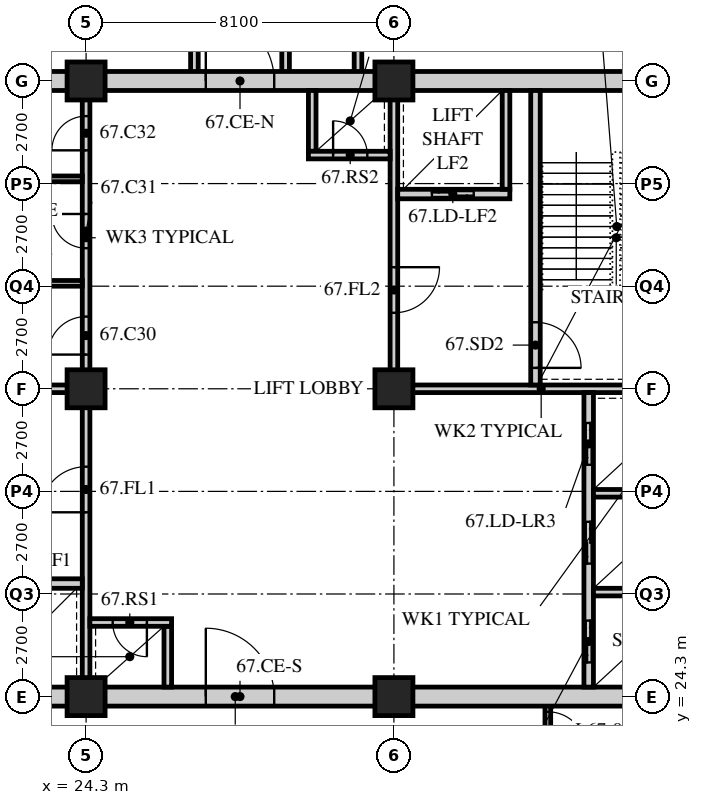
"""IFC4 building model, lengths in metres.
Left out: names, types, materials, properties, quantities, classifications, styles, units other than length and angle.
Written with IfcOpenShell. Run it as: python <this file> out.ifc"""

import sys

from ifc_helpers import new_model, si_unit, direction, frame, frame_2d, origin, origin_2d, place, context, subcontext, project, spatial, rectangle, hollow_rectangle, extrude, element, fill, save


model = new_model("IFC4")
c1 = context("Model", 3, precision=1e-05, world=origin(), true_north=direction((0.0, 1.0)))
c2 = subcontext(c1, "Body", "Model", "MODEL_VIEW")
j1 = project(units=[si_unit("LENGTHUNIT", "METRE"), si_unit("PLANEANGLEUNIT", "RADIAN")], contexts=[c1])
p1 = place(None, origin())
s1 = spatial("IfcSite", under=j1, at=p1, CompositionType="ELEMENT")
p2 = place(p1, origin())
s2 = spatial("IfcBuilding", under=s1, at=p2, CompositionType="ELEMENT")
p3 = place(p2, frame((0.0, 0.0, 261.9)))
s3 = spatial("IfcBuildingStorey", under=s2, at=p3, CompositionType="ELEMENT", Elevation=261.9)
for number, where, z_axis, x_axis in (
    (1, (24.3, 24.3, 0.0), (0.0, 0.0, 1.0), (1.0, 0.0, 0.0)),
    (2, (24.3, 32.4, 0.0), (0.0, 0.0, 1.0), (1.0, 0.0, 0.0)),
    (3, (24.3, 40.5, 0.0), (0.0, 0.0, 1.0), (1.0, 0.0, 0.0)),
    (4, (32.4, 24.3, 0.0), (0.0, 0.0, 1.0), (1.0, 0.0, 0.0)),
    (5, (32.4, 32.4, 0.0), (0.0, 0.0, 1.0), (1.0, 0.0, 0.0)),
    (6, (32.4, 40.5, 0.0), (0.0, 0.0, 1.0), (1.0, 0.0, 0.0)),
):
    element("IfcColumn", number, at=place(p3, frame(where, z_axis=z_axis, x_axis=x_axis)), inside=s3, PredefinedType="COLUMN", context=c2, shape_type="SweptSolid", body=[
        extrude(hollow_rectangle(XDim=1.0, YDim=1.0, WallThickness=0.1, at=origin_2d()), origin(), (0.0, 0.0, 1.0), 3.9),
    ])
for number, where, z_axis, x_axis in (
    (7, (31.455, 46.8, 0.0), (0.0, 0.0, 1.0), (0.0, -1.0, 0.0)),
    (8, (27.15, 40.5, 0.0), (0.0, 0.0, 1.0), (0.0, 1.0, 0.0)),
    (9, (29.55, 40.5, 0.0), (0.0, 0.0, 1.0), (0.0, 1.0, 0.0)),
):
    element("IfcWall", number, at=place(p3, frame(where, z_axis=z_axis, x_axis=x_axis)), inside=s3, PredefinedType="SOLIDWALL", context=c2, shape_type="SweptSolid", body=[
        extrude(rectangle(XDim=6.3, YDim=0.2, at=frame_2d((3.15, 0.0))), origin(), (0.0, 0.0, 1.0), 3.69),
    ])
p4 = place(p3, frame((36.45, 22.5, 0.0), z_axis=(0.0, 0.0, 1.0), x_axis=(0.0, 1.0, 0.0)))
e10 = element("IfcWall", 10, at=p4, inside=s3, PredefinedType="PARTITIONING", context=c2, shape_type="SweptSolid", body=[
    extrude(rectangle(XDim=1.8, YDim=0.15, at=frame_2d((0.9, 0.0))), origin(), (0.0, 0.0, 1.0), 3.69),
])
p5 = place(p4, frame((0.4, 0.0, 0.0)))
e11 = element("IfcOpeningElement", 11, at=p5, cuts=e10, PredefinedType="OPENING", context=c2, shape_type="SweptSolid", body=[
    extrude(rectangle(XDim=1.0, YDim=2.1, at=frame_2d((0.5, 1.05))), frame((0.0, 0.085, 0.0), z_axis=(0.0, -1.0, 0.0), x_axis=(1.0, 0.0, 0.0)), (0.0, 0.0, 1.0), 0.17),
])
p6 = place(p3, frame((15.95, 24.3, 0.0), z_axis=(0.0, 0.0, 1.0), x_axis=(1.0, 0.0, 0.0)))
e12 = element("IfcWall", 12, at=p6, inside=s3, PredefinedType="SOLIDWALL", context=c2, shape_type="SweptSolid", body=[
    extrude(rectangle(XDim=24.55, YDim=0.5, at=frame_2d((12.275, 0.0))), origin(), (0.0, 0.0, 1.0), 3.04),
])
p7 = place(p6, frame((11.5, 0.0, 0.0)))
e13 = element("IfcOpeningElement", 13, at=p7, cuts=e12, PredefinedType="OPENING", context=c2, shape_type="SweptSolid", body=[
    extrude(rectangle(XDim=1.8, YDim=2.4, at=frame_2d((0.9, 1.2))), frame((0.0, 0.26, 0.0), z_axis=(0.0, -1.0, 0.0), x_axis=(1.0, 0.0, 0.0)), (0.0, 0.0, 1.0), 0.52),
])
p8 = place(p3, frame((15.95, 40.5, 0.0), z_axis=(0.0, 0.0, 1.0), x_axis=(1.0, 0.0, 0.0)))
e14 = element("IfcWall", 14, at=p8, inside=s3, PredefinedType="SOLIDWALL", context=c2, shape_type="SweptSolid", body=[
    extrude(rectangle(XDim=24.55, YDim=0.5, at=frame_2d((12.275, 0.0))), origin(), (0.0, 0.0, 1.0), 3.04),
])
p9 = place(p8, frame((11.5, 0.0, 0.0)))
e15 = element("IfcOpeningElement", 15, at=p9, cuts=e14, PredefinedType="OPENING", context=c2, shape_type="SweptSolid", body=[
    extrude(rectangle(XDim=1.8, YDim=2.4, at=frame_2d((0.9, 1.2))), frame((0.0, 0.26, 0.0), z_axis=(0.0, -1.0, 0.0), x_axis=(1.0, 0.0, 0.0)), (0.0, 0.0, 1.0), 0.52),
])
p10 = place(p3, frame((16.45, 32.4, 0.0), z_axis=(0.0, 0.0, 1.0), x_axis=(1.0, 0.0, 0.0)))
e16 = element("IfcWall", 16, at=p10, inside=s3, PredefinedType="SOLIDWALL", context=c2, shape_type="SweptSolid", body=[
    extrude(rectangle(XDim=7.95, YDim=0.2, at=frame_2d((3.975, 0.0))), origin(), (0.0, 0.0, 1.0), 3.078),
])
p11 = place(p3, frame((24.3, 24.55, 0.0), z_axis=(0.0, 0.0, 1.0), x_axis=(0.0, 1.0, 0.0)))
e17 = element("IfcWall", 17, at=p11, inside=s3, PredefinedType="SOLIDWALL", context=c2, shape_type="SweptSolid", body=[
    extrude(rectangle(XDim=7.75, YDim=0.2, at=frame_2d((3.875, 0.0))), origin(), (0.0, 0.0, 1.0), 3.078),
])
p12 = place(p11, frame((4.6, 0.0, 0.0)))
e18 = element("IfcOpeningElement", 18, at=p12, cuts=e17, PredefinedType="OPENING", context=c2, shape_type="SweptSolid", body=[
    extrude(rectangle(XDim=1.2, YDim=2.1, at=frame_2d((0.6, 1.05))), frame((0.0, 0.11, 0.0), z_axis=(0.0, -1.0, 0.0), x_axis=(1.0, 0.0, 0.0)), (0.0, 0.0, 1.0), 0.22),
])
p13 = place(p3, frame((21.25, 27.275, 0.0), z_axis=(0.0, 0.0, 1.0), x_axis=(1.0, 0.0, 0.0)))
e19 = element("IfcWall", 19, at=p13, inside=s3, PredefinedType="SOLIDWALL", context=c2, shape_type="SweptSolid", body=[
    extrude(rectangle(XDim=2.95, YDim=0.25, at=frame_2d((1.475, 0.0))), origin(), (0.0, 0.0, 1.0), 3.69),
])
p14 = place(p13, frame((0.95, 0.0, 0.0)))
e20 = element("IfcOpeningElement", 20, at=p14, cuts=e19, PredefinedType="OPENING", context=c2, shape_type="SweptSolid", body=[
    extrude(rectangle(XDim=1.1, YDim=2.4, at=frame_2d((0.55, 1.2))), frame((0.0, 0.135, 0.0), z_axis=(0.0, -1.0, 0.0), x_axis=(1.0, 0.0, 0.0)), (0.0, 0.0, 1.0), 0.27),
])
p15 = place(p3, frame((26.45, 24.55, 0.0), z_axis=(0.0, 0.0, 1.0), x_axis=(0.0, 1.0, 0.0)))
e21 = element("IfcWall", 21, at=p15, inside=s3, PredefinedType="SOLIDWALL", context=c2, shape_type="SweptSolid", body=[
    extrude(rectangle(XDim=1.6, YDim=0.2, at=frame_2d((0.8, 0.0))), origin(), (0.0, 0.0, 1.0), 3.69),
])
p16 = place(p3, frame((24.4, 26.25, 0.0), z_axis=(0.0, 0.0, 1.0), x_axis=(1.0, 0.0, 0.0)))
e22 = element("IfcWall", 22, at=p16, inside=s3, PredefinedType="SOLIDWALL", context=c2, shape_type="SweptSolid", body=[
    extrude(rectangle(XDim=2.15, YDim=0.2, at=frame_2d((1.075, 0.0))), origin(), (0.0, 0.0, 1.0), 3.69),
])
p17 = place(p16, frame((0.6, 0.0, 0.0)))
e23 = element("IfcOpeningElement", 23, at=p17, cuts=e22, PredefinedType="OPENING", context=c2, shape_type="SweptSolid", body=[
    extrude(rectangle(XDim=0.9, YDim=2.1, at=frame_2d((0.45, 1.05))), frame((0.0, 0.11, 0.0), z_axis=(0.0, -1.0, 0.0), x_axis=(1.0, 0.0, 0.0)), (0.0, 0.0, 1.0), 0.22),
])
p18 = place(p3, frame((32.3, 32.4, 0.0), z_axis=(0.0, 0.0, 1.0), x_axis=(1.0, 0.0, 0.0)))
e24 = element("IfcWall", 24, at=p18, inside=s3, PredefinedType="SOLIDWALL", context=c2, shape_type="SweptSolid", body=[
    extrude(rectangle(XDim=7.95, YDim=0.2, at=frame_2d((3.975, 0.0))), origin(), (0.0, 0.0, 1.0), 3.078),
])
p19 = place(p3, frame((32.4, 32.5, 0.0), z_axis=(0.0, 0.0, 1.0), x_axis=(0.0, 1.0, 0.0)))
e25 = element("IfcWall", 25, at=p19, inside=s3, PredefinedType="SOLIDWALL", context=c2, shape_type="SweptSolid", body=[
    extrude(rectangle(XDim=7.75, YDim=0.2, at=frame_2d((3.875, 0.0))), origin(), (0.0, 0.0, 1.0), 3.078),
])
p20 = place(p19, frame((1.9, 0.0, 0.0)))
e26 = element("IfcOpeningElement", 26, at=p20, cuts=e25, PredefinedType="OPENING", context=c2, shape_type="SweptSolid", body=[
    extrude(rectangle(XDim=1.2, YDim=2.1, at=frame_2d((0.6, 1.05))), frame((0.0, 0.11, 0.0), z_axis=(0.0, -1.0, 0.0), x_axis=(1.0, 0.0, 0.0)), (0.0, 0.0, 1.0), 0.22),
])
p21 = place(p3, frame((37.525, 24.55, 0.0), z_axis=(0.0, 0.0, 1.0), x_axis=(0.0, 1.0, 0.0)))
e27 = element("IfcWall", 27, at=p21, inside=s3, PredefinedType="SOLIDWALL", context=c2, shape_type="SweptSolid", body=[
    extrude(rectangle(XDim=7.75, YDim=0.25, at=frame_2d((3.875, 0.0))), origin(), (0.0, 0.0, 1.0), 3.69),
])
p22 = place(p21, frame((0.65, 0.0, 0.0)))
e28 = element("IfcOpeningElement", 28, at=p22, cuts=e27, PredefinedType="OPENING", context=c2, shape_type="SweptSolid", body=[
    extrude(rectangle(XDim=1.1, YDim=2.4, at=frame_2d((0.55, 1.2))), frame((0.0, 0.135, 0.0), z_axis=(0.0, -1.0, 0.0), x_axis=(1.0, 0.0, 0.0)), (0.0, 0.0, 1.0), 0.27),
])
p23 = place(p21, frame((3.25, 0.0, 0.0)))
e29 = element("IfcOpeningElement", 29, at=p23, cuts=e27, PredefinedType="OPENING", context=c2, shape_type="SweptSolid", body=[
    extrude(rectangle(XDim=1.1, YDim=2.4, at=frame_2d((0.55, 1.2))), frame((0.0, 0.135, 0.0), z_axis=(0.0, -1.0, 0.0), x_axis=(1.0, 0.0, 0.0)), (0.0, 0.0, 1.0), 0.27),
])
p24 = place(p21, frame((5.85, 0.0, 0.0)))
e30 = element("IfcOpeningElement", 30, at=p24, cuts=e27, PredefinedType="OPENING", context=c2, shape_type="SweptSolid", body=[
    extrude(rectangle(XDim=1.1, YDim=2.4, at=frame_2d((0.55, 1.2))), frame((0.0, 0.135, 0.0), z_axis=(0.0, -1.0, 0.0), x_axis=(1.0, 0.0, 0.0)), (0.0, 0.0, 1.0), 0.27),
])
for number, where, z_axis, x_axis in (
    (31, (37.65, 27.05, 0.0), (0.0, 0.0, 1.0), (1.0, 0.0, 0.0)),
    (32, (37.65, 29.65, 0.0), (0.0, 0.0, 1.0), (1.0, 0.0, 0.0)),
):
    element("IfcWall", number, at=place(p3, frame(where, z_axis=z_axis, x_axis=x_axis)), inside=s3, PredefinedType="SOLIDWALL", context=c2, shape_type="SweptSolid", body=[
        extrude(rectangle(XDim=2.6, YDim=0.2, at=frame_2d((1.3, 0.0))), origin(), (0.0, 0.0, 1.0), 3.69),
    ])
p25 = place(p3, frame((36.125, 32.5, 0.0), z_axis=(0.0, 0.0, 1.0), x_axis=(0.0, 1.0, 0.0)))
e33 = element("IfcWall", 33, at=p25, inside=s3, PredefinedType="SOLIDWALL", context=c2, shape_type="SweptSolid", body=[
    extrude(rectangle(XDim=7.75, YDim=0.25, at=frame_2d((3.875, 0.0))), origin(), (0.0, 0.0, 1.0), 3.69),
])
p26 = place(p25, frame((0.45, 0.0, 0.0)))
e34 = element("IfcOpeningElement", 34, at=p26, cuts=e33, PredefinedType="OPENING", context=c2, shape_type="SweptSolid", body=[
    extrude(rectangle(XDim=1.2, YDim=2.1, at=frame_2d((0.6, 1.05))), frame((0.0, 0.135, 0.0), z_axis=(0.0, -1.0, 0.0), x_axis=(1.0, 0.0, 0.0)), (0.0, 0.0, 1.0), 0.27),
])
p27 = place(p3, frame((32.5, 37.525, 0.0), z_axis=(0.0, 0.0, 1.0), x_axis=(1.0, 0.0, 0.0)))
e35 = element("IfcWall", 35, at=p27, inside=s3, PredefinedType="SOLIDWALL", context=c2, shape_type="SweptSolid", body=[
    extrude(rectangle(XDim=2.95, YDim=0.25, at=frame_2d((1.475, 0.0))), origin(), (0.0, 0.0, 1.0), 3.69),
])
p28 = place(p27, frame((0.9, 0.0, 0.0)))
e36 = element("IfcOpeningElement", 36, at=p28, cuts=e35, PredefinedType="OPENING", context=c2, shape_type="SweptSolid", body=[
    extrude(rectangle(XDim=1.1, YDim=2.4, at=frame_2d((0.55, 1.2))), frame((0.0, 0.135, 0.0), z_axis=(0.0, -1.0, 0.0), x_axis=(1.0, 0.0, 0.0)), (0.0, 0.0, 1.0), 0.27),
])
p29 = place(p3, frame((35.35, 37.65, 0.0), z_axis=(0.0, 0.0, 1.0), x_axis=(0.0, 1.0, 0.0)))
e37 = element("IfcWall", 37, at=p29, inside=s3, PredefinedType="SOLIDWALL", context=c2, shape_type="SweptSolid", body=[
    extrude(rectangle(XDim=2.6, YDim=0.2, at=frame_2d((1.3, 0.0))), origin(), (0.0, 0.0, 1.0), 3.69),
])
p30 = place(p3, frame((30.25, 38.65, 0.0), z_axis=(0.0, 0.0, 1.0), x_axis=(0.0, 1.0, 0.0)))
e38 = element("IfcWall", 38, at=p30, inside=s3, PredefinedType="SOLIDWALL", context=c2, shape_type="SweptSolid", body=[
    extrude(rectangle(XDim=1.6, YDim=0.2, at=frame_2d((0.8, 0.0))), origin(), (0.0, 0.0, 1.0), 3.69),
])
p31 = place(p3, frame((30.15, 38.55, 0.0), z_axis=(0.0, 0.0, 1.0), x_axis=(1.0, 0.0, 0.0)))
e39 = element("IfcWall", 39, at=p31, inside=s3, PredefinedType="SOLIDWALL", context=c2, shape_type="SweptSolid", body=[
    extrude(rectangle(XDim=2.15, YDim=0.2, at=frame_2d((1.075, 0.0))), origin(), (0.0, 0.0, 1.0), 3.69),
])
p32 = place(p31, frame((0.65, 0.0, 0.0)))
e40 = element("IfcOpeningElement", 40, at=p32, cuts=e39, PredefinedType="OPENING", context=c2, shape_type="SweptSolid", body=[
    extrude(rectangle(XDim=0.9, YDim=2.1, at=frame_2d((0.45, 1.05))), frame((0.0, 0.11, 0.0), z_axis=(0.0, -1.0, 0.0), x_axis=(1.0, 0.0, 0.0)), (0.0, 0.0, 1.0), 0.22),
])
p33 = place(p3, frame((24.3, 32.5, 0.0), z_axis=(0.0, 0.0, 1.0), x_axis=(0.0, 1.0, 0.0)))
e41 = element("IfcWall", 41, at=p33, inside=s3, PredefinedType="PARTITIONING", context=c2, shape_type="SweptSolid", body=[
    extrude(rectangle(XDim=7.75, YDim=0.2, at=frame_2d((3.875, 0.0))), origin(), (0.0, 0.0, 1.0), 3.078),
])
p34 = place(p33, frame((0.8, 0.0, 0.0)))
e42 = element("IfcOpeningElement", 42, at=p34, cuts=e41, PredefinedType="OPENING", context=c2, shape_type="SweptSolid", body=[
    extrude(rectangle(XDim=1.0, YDim=2.1, at=frame_2d((0.5, 1.05))), frame((0.0, 0.11, 0.0), z_axis=(0.0, -1.0, 0.0), x_axis=(1.0, 0.0, 0.0)), (0.0, 0.0, 1.0), 0.22),
])
p35 = place(p33, frame((3.6, 0.0, 0.0)))
e43 = element("IfcOpeningElement", 43, at=p35, cuts=e41, PredefinedType="OPENING", context=c2, shape_type="SweptSolid", body=[
    extrude(rectangle(XDim=0.9, YDim=2.1, at=frame_2d((0.45, 1.05))), frame((0.0, 0.11, 0.0), z_axis=(0.0, -1.0, 0.0), x_axis=(1.0, 0.0, 0.0)), (0.0, 0.0, 1.0), 0.22),
])
p36 = place(p33, frame((6.175, 0.0, 0.0)))
e44 = element("IfcOpeningElement", 44, at=p36, cuts=e41, PredefinedType="OPENING", context=c2, shape_type="SweptSolid", body=[
    extrude(rectangle(XDim=0.9, YDim=2.1, at=frame_2d((0.45, 1.05))), frame((0.0, 0.11, 0.0), z_axis=(0.0, -1.0, 0.0), x_axis=(1.0, 0.0, 0.0)), (0.0, 0.0, 1.0), 0.22),
])
for number, where, z_axis, x_axis in (
    (45, (21.65, 35.175, 0.0), (0.0, 0.0, 1.0), (1.0, 0.0, 0.0)),
    (46, (21.65, 37.925, 0.0), (0.0, 0.0, 1.0), (1.0, 0.0, 0.0)),
):
    element("IfcWall", number, at=place(p3, frame(where, z_axis=z_axis, x_axis=x_axis)), inside=s3, PredefinedType="PARTITIONING", context=c2, shape_type="SweptSolid", body=[
        extrude(rectangle(XDim=2.55, YDim=0.15, at=frame_2d((1.275, 0.0))), origin(), (0.0, 0.0, 1.0), 3.69),
    ])
p37 = place(p5, origin())
e47 = element("IfcDoor", 47, at=p37, inside=s3, OperationType="SINGLE_SWING_RIGHT", PredefinedType="DOOR", context=c2, shape_type="SweptSolid", body=[
    extrude(rectangle(XDim=1.0, YDim=2.1, at=frame_2d((0.5, 1.05))), frame((0.0, 0.025, 0.0), z_axis=(0.0, -1.0, 0.0), x_axis=(1.0, 0.0, 0.0)), (0.0, 0.0, 1.0), 0.05),
])
fill(e11, e47)
p38 = place(p34, origin())
e48 = element("IfcDoor", 48, at=p38, inside=s3, OperationType="SINGLE_SWING_LEFT", PredefinedType="DOOR", context=c2, shape_type="SweptSolid", body=[
    extrude(rectangle(XDim=1.0, YDim=2.1, at=frame_2d((0.5, 1.05))), frame((0.0, 0.025, 0.0), z_axis=(0.0, -1.0, 0.0), x_axis=(1.0, 0.0, 0.0)), (0.0, 0.0, 1.0), 0.05),
])
fill(e42, e48)
p39 = place(p35, origin())
e49 = element("IfcDoor", 49, at=p39, inside=s3, OperationType="SINGLE_SWING_RIGHT", PredefinedType="DOOR", context=c2, shape_type="SweptSolid", body=[
    extrude(rectangle(XDim=0.9, YDim=2.1, at=frame_2d((0.45, 1.05))), frame((0.0, 0.025, 0.0), z_axis=(0.0, -1.0, 0.0), x_axis=(1.0, 0.0, 0.0)), (0.0, 0.0, 1.0), 0.05),
])
fill(e43, e49)
p40 = place(p36, origin())
e50 = element("IfcDoor", 50, at=p40, inside=s3, OperationType="SINGLE_SWING_LEFT", PredefinedType="DOOR", context=c2, shape_type="SweptSolid", body=[
    extrude(rectangle(XDim=0.9, YDim=2.1, at=frame_2d((0.45, 1.05))), frame((0.0, 0.025, 0.0), z_axis=(0.0, -1.0, 0.0), x_axis=(1.0, 0.0, 0.0)), (0.0, 0.0, 1.0), 0.05),
])
fill(e44, e50)
p41 = place(p12, origin())
e51 = element("IfcDoor", 51, at=p41, inside=s3, OperationType="SINGLE_SWING_LEFT", PredefinedType="DOOR", context=c2, shape_type="SweptSolid", body=[
    extrude(rectangle(XDim=1.2, YDim=2.1, at=frame_2d((0.6, 1.05))), frame((0.0, 0.025, 0.0), z_axis=(0.0, -1.0, 0.0), x_axis=(1.0, 0.0, 0.0)), (0.0, 0.0, 1.0), 0.05),
])
fill(e18, e51)
p42 = place(p17, origin())
e52 = element("IfcDoor", 52, at=p42, inside=s3, OperationType="SINGLE_SWING_LEFT", PredefinedType="DOOR", context=c2, shape_type="SweptSolid", body=[
    extrude(rectangle(XDim=0.9, YDim=2.1, at=frame_2d((0.45, 1.05))), frame((0.0, 0.025, 0.0), z_axis=(0.0, -1.0, 0.0), x_axis=(1.0, 0.0, 0.0)), (0.0, 0.0, 1.0), 0.05),
])
fill(e23, e52)
p43 = place(p26, origin())
e53 = element("IfcDoor", 53, at=p43, inside=s3, OperationType="SINGLE_SWING_RIGHT", PredefinedType="DOOR", context=c2, shape_type="SweptSolid", body=[
    extrude(rectangle(XDim=1.2, YDim=2.1, at=frame_2d((0.6, 1.05))), frame((0.0, 0.025, 0.0), z_axis=(0.0, -1.0, 0.0), x_axis=(1.0, 0.0, 0.0)), (0.0, 0.0, 1.0), 0.05),
])
fill(e34, e53)
p44 = place(p20, origin())
e54 = element("IfcDoor", 54, at=p44, inside=s3, OperationType="SINGLE_SWING_LEFT", PredefinedType="DOOR", context=c2, shape_type="SweptSolid", body=[
    extrude(rectangle(XDim=1.2, YDim=2.1, at=frame_2d((0.6, 1.05))), frame((0.0, 0.025, 0.0), z_axis=(0.0, -1.0, 0.0), x_axis=(1.0, 0.0, 0.0)), (0.0, 0.0, 1.0), 0.05),
])
fill(e26, e54)
p45 = place(p32, origin())
e55 = element("IfcDoor", 55, at=p45, inside=s3, OperationType="SINGLE_SWING_LEFT", PredefinedType="DOOR", context=c2, shape_type="SweptSolid", body=[
    extrude(rectangle(XDim=0.9, YDim=2.1, at=frame_2d((0.45, 1.05))), frame((0.0, 0.025, 0.0), z_axis=(0.0, -1.0, 0.0), x_axis=(1.0, 0.0, 0.0)), (0.0, 0.0, 1.0), 0.05),
])
fill(e40, e55)
p46 = place(p22, origin())
e56 = element("IfcDoor", 56, at=p46, inside=s3, OperationType="DOUBLE_DOOR_SLIDING", PredefinedType="DOOR", context=c2, shape_type="SweptSolid", body=[
    extrude(rectangle(XDim=1.1, YDim=2.4, at=frame_2d((0.55, 1.2))), frame((0.0, 0.025, 0.0), z_axis=(0.0, -1.0, 0.0), x_axis=(1.0, 0.0, 0.0)), (0.0, 0.0, 1.0), 0.05),
])
fill(e28, e56)
p47 = place(p23, origin())
e57 = element("IfcDoor", 57, at=p47, inside=s3, OperationType="DOUBLE_DOOR_SLIDING", PredefinedType="DOOR", context=c2, shape_type="SweptSolid", body=[
    extrude(rectangle(XDim=1.1, YDim=2.4, at=frame_2d((0.55, 1.2))), frame((0.0, 0.025, 0.0), z_axis=(0.0, -1.0, 0.0), x_axis=(1.0, 0.0, 0.0)), (0.0, 0.0, 1.0), 0.05),
])
fill(e29, e57)
p48 = place(p24, origin())
e58 = element("IfcDoor", 58, at=p48, inside=s3, OperationType="DOUBLE_DOOR_SLIDING", PredefinedType="DOOR", context=c2, shape_type="SweptSolid", body=[
    extrude(rectangle(XDim=1.1, YDim=2.4, at=frame_2d((0.55, 1.2))), frame((0.0, 0.025, 0.0), z_axis=(0.0, -1.0, 0.0), x_axis=(1.0, 0.0, 0.0)), (0.0, 0.0, 1.0), 0.05),
])
fill(e30, e58)
p49 = place(p28, origin())
e59 = element("IfcDoor", 59, at=p49, inside=s3, OperationType="DOUBLE_DOOR_SLIDING", PredefinedType="DOOR", context=c2, shape_type="SweptSolid", body=[
    extrude(rectangle(XDim=1.1, YDim=2.4, at=frame_2d((0.55, 1.2))), frame((0.0, 0.025, 0.0), z_axis=(0.0, -1.0, 0.0), x_axis=(1.0, 0.0, 0.0)), (0.0, 0.0, 1.0), 0.05),
])
fill(e36, e59)
p50 = place(p7, origin())
e60 = element("IfcDoor", 60, at=p50, inside=s3, OperationType="DOUBLE_DOOR_SINGLE_SWING", PredefinedType="DOOR", context=c2, shape_type="SweptSolid", body=[
    extrude(rectangle(XDim=1.8, YDim=2.4, at=frame_2d((0.9, 1.2))), frame((0.0, 0.025, 0.0), z_axis=(0.0, -1.0, 0.0), x_axis=(1.0, 0.0, 0.0)), (0.0, 0.0, 1.0), 0.05),
])
fill(e13, e60)
p51 = place(p9, origin())
e61 = element("IfcDoor", 61, at=p51, inside=s3, OperationType="DOUBLE_DOOR_SINGLE_SWING", PredefinedType="DOOR", context=c2, shape_type="SweptSolid", body=[
    extrude(rectangle(XDim=1.8, YDim=2.4, at=frame_2d((0.9, 1.2))), frame((0.0, 0.025, 0.0), z_axis=(0.0, -1.0, 0.0), x_axis=(1.0, 0.0, 0.0)), (0.0, 0.0, 1.0), 0.05),
])
fill(e15, e61)
save(model, sys.argv[1])
